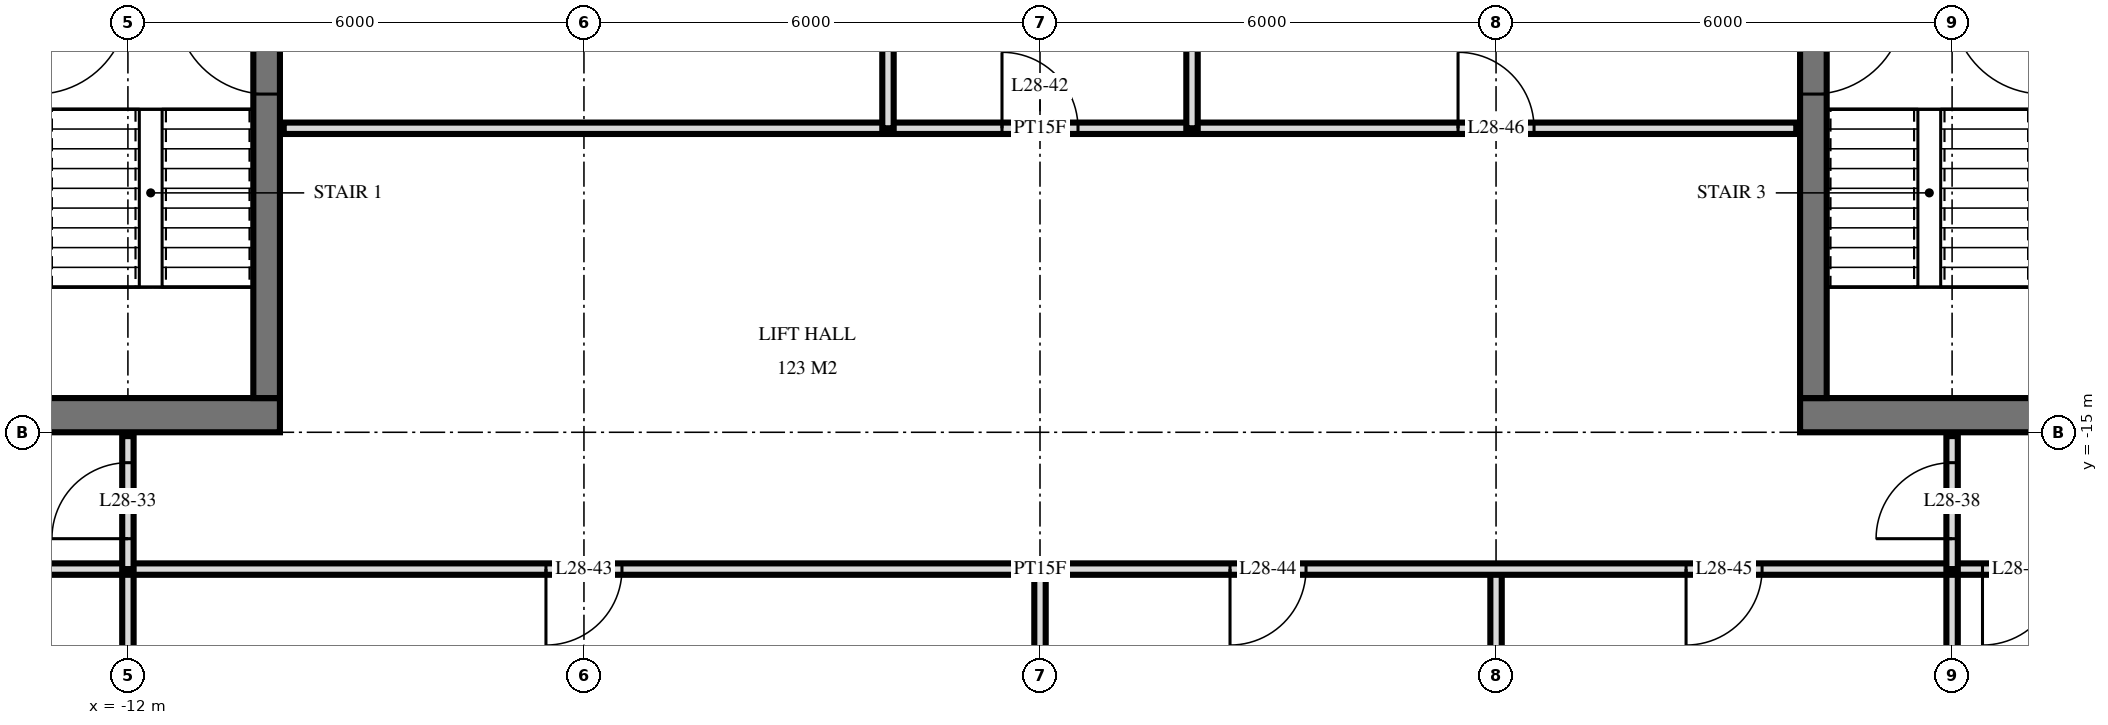
"""IFC4 building model, lengths in metres.
Left out: names, types, materials, properties, quantities, classifications, styles, units other than length and angle.
Written with IfcOpenShell. Run it as: python <this file> out.ifc"""

import sys

from ifc_helpers import new_model, si_unit, direction, frame, frame_2d, origin, place, context, subcontext, project, spatial, rectangle, extrude, element, fill, save


model = new_model("IFC4")
c1 = context("Model", 3, precision=1e-05, world=origin(), true_north=direction((0.0, 1.0)))
c2 = subcontext(c1, "Body", "Model", "MODEL_VIEW")
j1 = project(units=[si_unit("LENGTHUNIT", "METRE"), si_unit("PLANEANGLEUNIT", "RADIAN")], contexts=[c1])
p1 = place(None, origin())
s1 = spatial("IfcSite", under=j1, at=p1, CompositionType="ELEMENT")
p2 = place(p1, origin())
s2 = spatial("IfcBuilding", under=s1, at=p2, CompositionType="ELEMENT")
p3 = place(p2, frame((0.0, 0.0, 112.8)))
s3 = spatial("IfcBuildingStorey", under=s2, at=p3, CompositionType="ELEMENT", Elevation=112.8)
p4 = place(p3, frame((-24.5, -14.775, 0.0), z_axis=(0.0, 0.0, 1.0), x_axis=(1.0, 0.0, 0.0)))
e1 = element("IfcWall", 1, at=p4, inside=s3, PredefinedType="SHEAR", context=c2, shape_type="SweptSolid", body=[
    extrude(rectangle(XDim=14.5, YDim=0.45, at=frame_2d((7.25, 0.0))), origin(), (0.0, 0.0, 1.0), 3.6),
])
p5 = place(p4, frame((6.2, 0.0, 0.0)))
e2 = element("IfcOpeningElement", 2, at=p5, cuts=e1, PredefinedType="OPENING", context=c2, shape_type="SweptSolid", body=[
    extrude(rectangle(XDim=1.2, YDim=2.1, at=frame_2d((0.6, 1.05))), frame((0.0, 0.235, 0.0), z_axis=(0.0, -1.0, 0.0), x_axis=(1.0, 0.0, 0.0)), (0.0, 0.0, 1.0), 0.47),
])
p6 = place(p4, frame((9.25, 0.0, 0.0)))
e3 = element("IfcOpeningElement", 3, at=p6, cuts=e1, PredefinedType="OPENING", context=c2, shape_type="SweptSolid", body=[
    extrude(rectangle(XDim=1.1, YDim=2.1, at=frame_2d((0.55, 1.05))), frame((0.0, 0.235, 0.0), z_axis=(0.0, -1.0, 0.0), x_axis=(1.0, 0.0, 0.0)), (0.0, 0.0, 1.0), 0.47),
])
p7 = place(p4, frame((3.5, 0.0, 0.0)))
e4 = element("IfcOpeningElement", 4, at=p7, cuts=e1, PredefinedType="OPENING", context=c2, shape_type="SweptSolid", body=[
    extrude(rectangle(XDim=0.9, YDim=2.1, at=frame_2d((0.45, 1.05))), frame((0.0, 0.235, 0.0), z_axis=(0.0, -1.0, 0.0), x_axis=(1.0, 0.0, 0.0)), (0.0, 0.0, 1.0), 0.47),
])
p8 = place(p4, frame((1.05, 0.0, 0.0)))
e5 = element("IfcOpeningElement", 5, at=p8, cuts=e1, PredefinedType="OPENING", context=c2, shape_type="SweptSolid", body=[
    extrude(rectangle(XDim=1.0, YDim=2.1, at=frame_2d((0.5, 1.05))), frame((0.0, 0.235, 0.0), z_axis=(0.0, -1.0, 0.0), x_axis=(1.0, 0.0, 0.0)), (0.0, 0.0, 1.0), 0.47),
])
p9 = place(p3, frame((-10.175, -14.55, 0.0), z_axis=(0.0, 0.0, 1.0), x_axis=(0.0, 1.0, 0.0)))
e6 = element("IfcWall", 6, at=p9, inside=s3, PredefinedType="SHEAR", context=c2, shape_type="SweptSolid", body=[
    extrude(rectangle(XDim=14.1, YDim=0.35, at=frame_2d((7.05, 0.0))), origin(), (0.0, 0.0, 1.0), 3.6),
])
p10 = place(p9, frame((8.4, 0.0, 0.0)))
e7 = element("IfcOpeningElement", 7, at=p10, cuts=e6, PredefinedType="OPENING", context=c2, shape_type="SweptSolid", body=[
    extrude(rectangle(XDim=1.4, YDim=2.4, at=frame_2d((0.7, 1.2))), frame((0.0, 0.185, 0.0), z_axis=(0.0, -1.0, 0.0), x_axis=(1.0, 0.0, 0.0)), (0.0, 0.0, 1.0), 0.37),
])
p11 = place(p9, frame((10.0, 0.0, 0.0)))
e8 = element("IfcOpeningElement", 8, at=p11, cuts=e6, PredefinedType="OPENING", context=c2, shape_type="SweptSolid", body=[
    extrude(rectangle(XDim=1.4, YDim=2.4, at=frame_2d((0.7, 1.2))), frame((0.0, 0.185, 0.0), z_axis=(0.0, -1.0, 0.0), x_axis=(1.0, 0.0, 0.0)), (0.0, 0.0, 1.0), 0.37),
])
p12 = place(p9, frame((4.0, 0.0, 0.0)))
e9 = element("IfcOpeningElement", 9, at=p12, cuts=e6, PredefinedType="OPENING", context=c2, shape_type="SweptSolid", body=[
    extrude(rectangle(XDim=1.2, YDim=2.1, at=frame_2d((0.6, 1.05))), frame((0.0, 0.185, 0.0), z_axis=(0.0, -1.0, 0.0), x_axis=(1.0, 0.0, 0.0)), (0.0, 0.0, 1.0), 0.37),
])
p13 = place(p3, frame((10.0, -14.775, 0.0), z_axis=(0.0, 0.0, 1.0), x_axis=(1.0, 0.0, 0.0)))
e10 = element("IfcWall", 10, at=p13, inside=s3, PredefinedType="SHEAR", context=c2, shape_type="SweptSolid", body=[
    extrude(rectangle(XDim=14.5, YDim=0.45, at=frame_2d((7.25, 0.0))), origin(), (0.0, 0.0, 1.0), 3.6),
])
p14 = place(p13, frame((7.1, 0.0, 0.0)))
e11 = element("IfcOpeningElement", 11, at=p14, cuts=e10, PredefinedType="OPENING", context=c2, shape_type="SweptSolid", body=[
    extrude(rectangle(XDim=1.2, YDim=2.1, at=frame_2d((0.6, 1.05))), frame((0.0, 0.235, 0.0), z_axis=(0.0, -1.0, 0.0), x_axis=(1.0, 0.0, 0.0)), (0.0, 0.0, 1.0), 0.47),
])
p15 = place(p13, frame((4.15, 0.0, 0.0)))
e12 = element("IfcOpeningElement", 12, at=p15, cuts=e10, PredefinedType="OPENING", context=c2, shape_type="SweptSolid", body=[
    extrude(rectangle(XDim=1.1, YDim=2.1, at=frame_2d((0.55, 1.05))), frame((0.0, 0.235, 0.0), z_axis=(0.0, -1.0, 0.0), x_axis=(1.0, 0.0, 0.0)), (0.0, 0.0, 1.0), 0.47),
])
p16 = place(p13, frame((10.1, 0.0, 0.0)))
e13 = element("IfcOpeningElement", 13, at=p16, cuts=e10, PredefinedType="OPENING", context=c2, shape_type="SweptSolid", body=[
    extrude(rectangle(XDim=0.9, YDim=2.1, at=frame_2d((0.45, 1.05))), frame((0.0, 0.235, 0.0), z_axis=(0.0, -1.0, 0.0), x_axis=(1.0, 0.0, 0.0)), (0.0, 0.0, 1.0), 0.47),
])
p17 = place(p13, frame((12.45, 0.0, 0.0)))
e14 = element("IfcOpeningElement", 14, at=p17, cuts=e10, PredefinedType="OPENING", context=c2, shape_type="SweptSolid", body=[
    extrude(rectangle(XDim=1.0, YDim=2.1, at=frame_2d((0.5, 1.05))), frame((0.0, 0.235, 0.0), z_axis=(0.0, -1.0, 0.0), x_axis=(1.0, 0.0, 0.0)), (0.0, 0.0, 1.0), 0.47),
])
p18 = place(p3, frame((10.175, -14.55, 0.0), z_axis=(0.0, 0.0, 1.0), x_axis=(0.0, 1.0, 0.0)))
e15 = element("IfcWall", 15, at=p18, inside=s3, PredefinedType="SHEAR", context=c2, shape_type="SweptSolid", body=[
    extrude(rectangle(XDim=14.1, YDim=0.35, at=frame_2d((7.05, 0.0))), origin(), (0.0, 0.0, 1.0), 3.6),
])
p19 = place(p18, frame((8.4, 0.0, 0.0)))
e16 = element("IfcOpeningElement", 16, at=p19, cuts=e15, PredefinedType="OPENING", context=c2, shape_type="SweptSolid", body=[
    extrude(rectangle(XDim=1.4, YDim=2.4, at=frame_2d((0.7, 1.2))), frame((0.0, 0.185, 0.0), z_axis=(0.0, -1.0, 0.0), x_axis=(1.0, 0.0, 0.0)), (0.0, 0.0, 1.0), 0.37),
])
p20 = place(p18, frame((10.0, 0.0, 0.0)))
e17 = element("IfcOpeningElement", 17, at=p20, cuts=e15, PredefinedType="OPENING", context=c2, shape_type="SweptSolid", body=[
    extrude(rectangle(XDim=1.4, YDim=2.4, at=frame_2d((0.7, 1.2))), frame((0.0, 0.185, 0.0), z_axis=(0.0, -1.0, 0.0), x_axis=(1.0, 0.0, 0.0)), (0.0, 0.0, 1.0), 0.37),
])
p21 = place(p18, frame((4.0, 0.0, 0.0)))
e18 = element("IfcOpeningElement", 18, at=p21, cuts=e15, PredefinedType="OPENING", context=c2, shape_type="SweptSolid", body=[
    extrude(rectangle(XDim=1.2, YDim=2.1, at=frame_2d((0.6, 1.05))), frame((0.0, 0.185, 0.0), z_axis=(0.0, -1.0, 0.0), x_axis=(1.0, 0.0, 0.0)), (0.0, 0.0, 1.0), 0.37),
])
p22 = place(p3, frame((12.0, -16.8, 0.0), z_axis=(0.0, 0.0, 1.0), x_axis=(0.0, 1.0, 0.0)))
e19 = element("IfcWall", 19, at=p22, inside=s3, PredefinedType="PARTITIONING", context=c2, shape_type="SweptSolid", body=[
    extrude(rectangle(XDim=1.75, YDim=0.15, at=frame_2d((0.875, 0.0))), origin(), (0.0, 0.0, 1.0), 3.32),
])
p23 = place(p22, frame((0.4, 0.0, 0.0)))
e20 = element("IfcOpeningElement", 20, at=p23, cuts=e19, PredefinedType="OPENING", context=c2, shape_type="SweptSolid", body=[
    extrude(rectangle(XDim=1.0, YDim=2.1, at=frame_2d((0.5, 1.05))), frame((0.0, 0.085, 0.0), z_axis=(0.0, -1.0, 0.0), x_axis=(1.0, 0.0, 0.0)), (0.0, 0.0, 1.0), 0.17),
])
for number, where, z_axis, x_axis in (
    (21, (12.0, -33.62, 0.0), (0.0, 0.0, 1.0), (0.0, 1.0, 0.0)),
    (22, (6.0, -33.62, 0.0), (0.0, 0.0, 1.0), (0.0, 1.0, 0.0)),
):
    element("IfcWall", number, at=place(p3, frame(where, z_axis=z_axis, x_axis=x_axis)), inside=s3, PredefinedType="PARTITIONING", context=c2, shape_type="SweptSolid", body=[
        extrude(rectangle(XDim=16.82, YDim=0.15, at=frame_2d((8.41, 0.0))), origin(), (0.0, 0.0, 1.0), 3.32),
    ])
p24 = place(p3, frame((2.0, -11.0, 0.0), z_axis=(0.0, 0.0, 1.0), x_axis=(0.0, 1.0, 0.0)))
e23 = element("IfcWall", 23, at=p24, inside=s3, PredefinedType="PARTITIONING", context=c2, shape_type="SweptSolid", body=[
    extrude(rectangle(XDim=4.0, YDim=0.15, at=frame_2d((2.0, 0.0))), origin(), (0.0, 0.0, 1.0), 3.32),
])
p25 = place(p3, frame((0.0, -33.62, 0.0), z_axis=(0.0, 0.0, 1.0), x_axis=(0.0, 1.0, 0.0)))
e24 = element("IfcWall", 24, at=p25, inside=s3, PredefinedType="PARTITIONING", context=c2, shape_type="SweptSolid", body=[
    extrude(rectangle(XDim=16.82, YDim=0.15, at=frame_2d((8.41, 0.0))), origin(), (0.0, 0.0, 1.0), 3.32),
])
p26 = place(p3, frame((-2.0, -11.0, 0.0), z_axis=(0.0, 0.0, 1.0), x_axis=(0.0, 1.0, 0.0)))
e25 = element("IfcWall", 25, at=p26, inside=s3, PredefinedType="PARTITIONING", context=c2, shape_type="SweptSolid", body=[
    extrude(rectangle(XDim=4.0, YDim=0.15, at=frame_2d((2.0, 0.0))), origin(), (0.0, 0.0, 1.0), 3.32),
])
p27 = place(p3, frame((-12.0, -16.8, 0.0), z_axis=(0.0, 0.0, 1.0), x_axis=(0.0, 1.0, 0.0)))
e26 = element("IfcWall", 26, at=p27, inside=s3, PredefinedType="PARTITIONING", context=c2, shape_type="SweptSolid", body=[
    extrude(rectangle(XDim=1.75, YDim=0.15, at=frame_2d((0.875, 0.0))), origin(), (0.0, 0.0, 1.0), 3.32),
])
p28 = place(p27, frame((0.4, 0.0, 0.0)))
e27 = element("IfcOpeningElement", 27, at=p28, cuts=e26, PredefinedType="OPENING", context=c2, shape_type="SweptSolid", body=[
    extrude(rectangle(XDim=1.0, YDim=2.1, at=frame_2d((0.5, 1.05))), frame((0.0, 0.085, 0.0), z_axis=(0.0, -1.0, 0.0), x_axis=(1.0, 0.0, 0.0)), (0.0, 0.0, 1.0), 0.17),
])
p29 = place(p3, frame((-12.0, -33.62, 0.0), z_axis=(0.0, 0.0, 1.0), x_axis=(0.0, 1.0, 0.0)))
e28 = element("IfcWall", 28, at=p29, inside=s3, PredefinedType="PARTITIONING", context=c2, shape_type="SweptSolid", body=[
    extrude(rectangle(XDim=16.82, YDim=0.15, at=frame_2d((8.41, 0.0))), origin(), (0.0, 0.0, 1.0), 3.32),
])
p30 = place(p3, frame((-28.02, -16.8, 0.0), z_axis=(0.0, 0.0, 1.0), x_axis=(1.0, 0.0, 0.0)))
e29 = element("IfcWall", 29, at=p30, inside=s3, PredefinedType="PARTITIONING", context=c2, shape_type="SweptSolid", body=[
    extrude(rectangle(XDim=56.04, YDim=0.15, at=frame_2d((28.02, 0.0))), origin(), (0.0, 0.0, 1.0), 3.32),
])
p31 = place(p30, frame((13.17, 0.0, 0.0)))
e30 = element("IfcOpeningElement", 30, at=p31, cuts=e29, PredefinedType="OPENING", context=c2, shape_type="SweptSolid", body=[
    extrude(rectangle(XDim=1.0, YDim=2.1, at=frame_2d((0.5, 1.05))), frame((0.0, 0.085, 0.0), z_axis=(0.0, -1.0, 0.0), x_axis=(1.0, 0.0, 0.0)), (0.0, 0.0, 1.0), 0.17),
])
p32 = place(p30, frame((11.87, 0.0, 0.0)))
e31 = element("IfcOpeningElement", 31, at=p32, cuts=e29, PredefinedType="OPENING", context=c2, shape_type="SweptSolid", body=[
    extrude(rectangle(XDim=1.0, YDim=2.1, at=frame_2d((0.5, 1.05))), frame((0.0, 0.085, 0.0), z_axis=(0.0, -1.0, 0.0), x_axis=(1.0, 0.0, 0.0)), (0.0, 0.0, 1.0), 0.17),
])
p33 = place(p30, frame((8.32, 0.0, 0.0)))
e32 = element("IfcOpeningElement", 32, at=p33, cuts=e29, PredefinedType="OPENING", context=c2, shape_type="SweptSolid", body=[
    extrude(rectangle(XDim=1.0, YDim=2.1, at=frame_2d((0.5, 1.05))), frame((0.0, 0.085, 0.0), z_axis=(0.0, -1.0, 0.0), x_axis=(1.0, 0.0, 0.0)), (0.0, 0.0, 1.0), 0.17),
])
p34 = place(p30, frame((40.42, 0.0, 0.0)))
e33 = element("IfcOpeningElement", 33, at=p34, cuts=e29, PredefinedType="OPENING", context=c2, shape_type="SweptSolid", body=[
    extrude(rectangle(XDim=1.0, YDim=2.1, at=frame_2d((0.5, 1.05))), frame((0.0, 0.085, 0.0), z_axis=(0.0, -1.0, 0.0), x_axis=(1.0, 0.0, 0.0)), (0.0, 0.0, 1.0), 0.17),
])
p35 = place(p30, frame((46.72, 0.0, 0.0)))
e34 = element("IfcOpeningElement", 34, at=p35, cuts=e29, PredefinedType="OPENING", context=c2, shape_type="SweptSolid", body=[
    extrude(rectangle(XDim=1.0, YDim=2.1, at=frame_2d((0.5, 1.05))), frame((0.0, 0.085, 0.0), z_axis=(0.0, -1.0, 0.0), x_axis=(1.0, 0.0, 0.0)), (0.0, 0.0, 1.0), 0.17),
])
p36 = place(p30, frame((21.52, 0.0, 0.0)))
e35 = element("IfcOpeningElement", 35, at=p36, cuts=e29, PredefinedType="OPENING", context=c2, shape_type="SweptSolid", body=[
    extrude(rectangle(XDim=1.0, YDim=2.1, at=frame_2d((0.5, 1.05))), frame((0.0, 0.085, 0.0), z_axis=(0.0, -1.0, 0.0), x_axis=(1.0, 0.0, 0.0)), (0.0, 0.0, 1.0), 0.17),
])
p37 = place(p30, frame((30.52, 0.0, 0.0)))
e36 = element("IfcOpeningElement", 36, at=p37, cuts=e29, PredefinedType="OPENING", context=c2, shape_type="SweptSolid", body=[
    extrude(rectangle(XDim=1.0, YDim=2.1, at=frame_2d((0.5, 1.05))), frame((0.0, 0.085, 0.0), z_axis=(0.0, -1.0, 0.0), x_axis=(1.0, 0.0, 0.0)), (0.0, 0.0, 1.0), 0.17),
])
p38 = place(p30, frame((36.52, 0.0, 0.0)))
e37 = element("IfcOpeningElement", 37, at=p38, cuts=e29, PredefinedType="OPENING", context=c2, shape_type="SweptSolid", body=[
    extrude(rectangle(XDim=1.0, YDim=2.1, at=frame_2d((0.5, 1.05))), frame((0.0, 0.085, 0.0), z_axis=(0.0, -1.0, 0.0), x_axis=(1.0, 0.0, 0.0)), (0.0, 0.0, 1.0), 0.17),
])
p39 = place(p3, frame((-9.95, -11.0, 0.0), z_axis=(0.0, 0.0, 1.0), x_axis=(1.0, 0.0, 0.0)))
e38 = element("IfcWall", 38, at=p39, inside=s3, PredefinedType="PARTITIONING", context=c2, shape_type="SweptSolid", body=[
    extrude(rectangle(XDim=19.9, YDim=0.15, at=frame_2d((9.95, 0.0))), origin(), (0.0, 0.0, 1.0), 3.32),
])
p40 = place(p39, frame((9.45, 0.0, 0.0)))
e39 = element("IfcOpeningElement", 39, at=p40, cuts=e38, PredefinedType="OPENING", context=c2, shape_type="SweptSolid", body=[
    extrude(rectangle(XDim=1.0, YDim=2.1, at=frame_2d((0.5, 1.05))), frame((0.0, 0.085, 0.0), z_axis=(0.0, -1.0, 0.0), x_axis=(1.0, 0.0, 0.0)), (0.0, 0.0, 1.0), 0.17),
])
p41 = place(p39, frame((15.45, 0.0, 0.0)))
e40 = element("IfcOpeningElement", 40, at=p41, cuts=e38, PredefinedType="OPENING", context=c2, shape_type="SweptSolid", body=[
    extrude(rectangle(XDim=1.0, YDim=2.1, at=frame_2d((0.5, 1.05))), frame((0.0, 0.085, 0.0), z_axis=(0.0, -1.0, 0.0), x_axis=(1.0, 0.0, 0.0)), (0.0, 0.0, 1.0), 0.17),
])
p42 = place(p12, origin())
e41 = element("IfcDoor", 41, at=p42, inside=s3, OperationType="SINGLE_SWING_LEFT", PredefinedType="DOOR", context=c2, shape_type="SweptSolid", body=[
    extrude(rectangle(XDim=1.2, YDim=2.1, at=frame_2d((0.6, 1.05))), frame((0.0, 0.025, 0.0), z_axis=(0.0, -1.0, 0.0), x_axis=(1.0, 0.0, 0.0)), (0.0, 0.0, 1.0), 0.05),
])
fill(e9, e41)
p43 = place(p21, frame((0.6, 0.0, 0.0), z_axis=(0.0, 0.0, 1.0), x_axis=(-1.0, 0.0, 0.0)))
e42 = element("IfcDoor", 42, at=p43, inside=s3, OperationType="SINGLE_SWING_RIGHT", PredefinedType="DOOR", context=c2, shape_type="SweptSolid", body=[
    extrude(rectangle(XDim=1.2, YDim=2.1, at=frame_2d((0.0, 1.05))), frame((0.0, -0.025, 0.0), z_axis=(0.0, 1.0, 0.0), x_axis=(-1.0, 0.0, 0.0)), (0.0, 0.0, 1.0), 0.05),
])
fill(e18, e42)
p44 = place(p28, origin())
e43 = element("IfcDoor", 43, at=p44, inside=s3, OperationType="SINGLE_SWING_RIGHT", PredefinedType="DOOR", context=c2, shape_type="SweptSolid", body=[
    extrude(rectangle(XDim=1.0, YDim=2.1, at=frame_2d((0.5, 1.05))), frame((0.0, 0.025, 0.0), z_axis=(0.0, -1.0, 0.0), x_axis=(1.0, 0.0, 0.0)), (0.0, 0.0, 1.0), 0.05),
])
fill(e27, e43)
p45 = place(p23, origin())
e44 = element("IfcDoor", 44, at=p45, inside=s3, OperationType="SINGLE_SWING_RIGHT", PredefinedType="DOOR", context=c2, shape_type="SweptSolid", body=[
    extrude(rectangle(XDim=1.0, YDim=2.1, at=frame_2d((0.5, 1.05))), frame((0.0, 0.025, 0.0), z_axis=(0.0, -1.0, 0.0), x_axis=(1.0, 0.0, 0.0)), (0.0, 0.0, 1.0), 0.05),
])
fill(e20, e44)
p46 = place(p34, frame((0.5, 0.0, 0.0), z_axis=(0.0, 0.0, 1.0), x_axis=(-1.0, 0.0, 0.0)))
e45 = element("IfcDoor", 45, at=p46, inside=s3, OperationType="SINGLE_SWING_LEFT", PredefinedType="DOOR", context=c2, shape_type="SweptSolid", body=[
    extrude(rectangle(XDim=1.0, YDim=2.1, at=frame_2d((0.0, 1.05))), frame((0.0, -0.025, 0.0), z_axis=(0.0, 1.0, 0.0), x_axis=(-1.0, 0.0, 0.0)), (0.0, 0.0, 1.0), 0.05),
])
fill(e33, e45)
p47 = place(p40, origin())
e46 = element("IfcDoor", 46, at=p47, inside=s3, OperationType="SINGLE_SWING_RIGHT", PredefinedType="DOOR", context=c2, shape_type="SweptSolid", body=[
    extrude(rectangle(XDim=1.0, YDim=2.1, at=frame_2d((0.5, 1.05))), frame((0.0, 0.025, 0.0), z_axis=(0.0, -1.0, 0.0), x_axis=(1.0, 0.0, 0.0)), (0.0, 0.0, 1.0), 0.05),
])
fill(e39, e46)
p48 = place(p36, frame((0.5, 0.0, 0.0), z_axis=(0.0, 0.0, 1.0), x_axis=(-1.0, 0.0, 0.0)))
e47 = element("IfcDoor", 47, at=p48, inside=s3, OperationType="SINGLE_SWING_LEFT", PredefinedType="DOOR", context=c2, shape_type="SweptSolid", body=[
    extrude(rectangle(XDim=1.0, YDim=2.1, at=frame_2d((0.0, 1.05))), frame((0.0, -0.025, 0.0), z_axis=(0.0, 1.0, 0.0), x_axis=(-1.0, 0.0, 0.0)), (0.0, 0.0, 1.0), 0.05),
])
fill(e35, e47)
p49 = place(p37, frame((0.5, 0.0, 0.0), z_axis=(0.0, 0.0, 1.0), x_axis=(-1.0, 0.0, 0.0)))
e48 = element("IfcDoor", 48, at=p49, inside=s3, OperationType="SINGLE_SWING_LEFT", PredefinedType="DOOR", context=c2, shape_type="SweptSolid", body=[
    extrude(rectangle(XDim=1.0, YDim=2.1, at=frame_2d((0.0, 1.05))), frame((0.0, -0.025, 0.0), z_axis=(0.0, 1.0, 0.0), x_axis=(-1.0, 0.0, 0.0)), (0.0, 0.0, 1.0), 0.05),
])
fill(e36, e48)
p50 = place(p38, frame((0.5, 0.0, 0.0), z_axis=(0.0, 0.0, 1.0), x_axis=(-1.0, 0.0, 0.0)))
e49 = element("IfcDoor", 49, at=p50, inside=s3, OperationType="SINGLE_SWING_LEFT", PredefinedType="DOOR", context=c2, shape_type="SweptSolid", body=[
    extrude(rectangle(XDim=1.0, YDim=2.1, at=frame_2d((0.0, 1.05))), frame((0.0, -0.025, 0.0), z_axis=(0.0, 1.0, 0.0), x_axis=(-1.0, 0.0, 0.0)), (0.0, 0.0, 1.0), 0.05),
])
fill(e37, e49)
p51 = place(p41, origin())
e50 = element("IfcDoor", 50, at=p51, inside=s3, OperationType="SINGLE_SWING_RIGHT", PredefinedType="DOOR", context=c2, shape_type="SweptSolid", body=[
    extrude(rectangle(XDim=1.0, YDim=2.1, at=frame_2d((0.5, 1.05))), frame((0.0, 0.025, 0.0), z_axis=(0.0, -1.0, 0.0), x_axis=(1.0, 0.0, 0.0)), (0.0, 0.0, 1.0), 0.05),
])
fill(e40, e50)
save(model, sys.argv[1])
